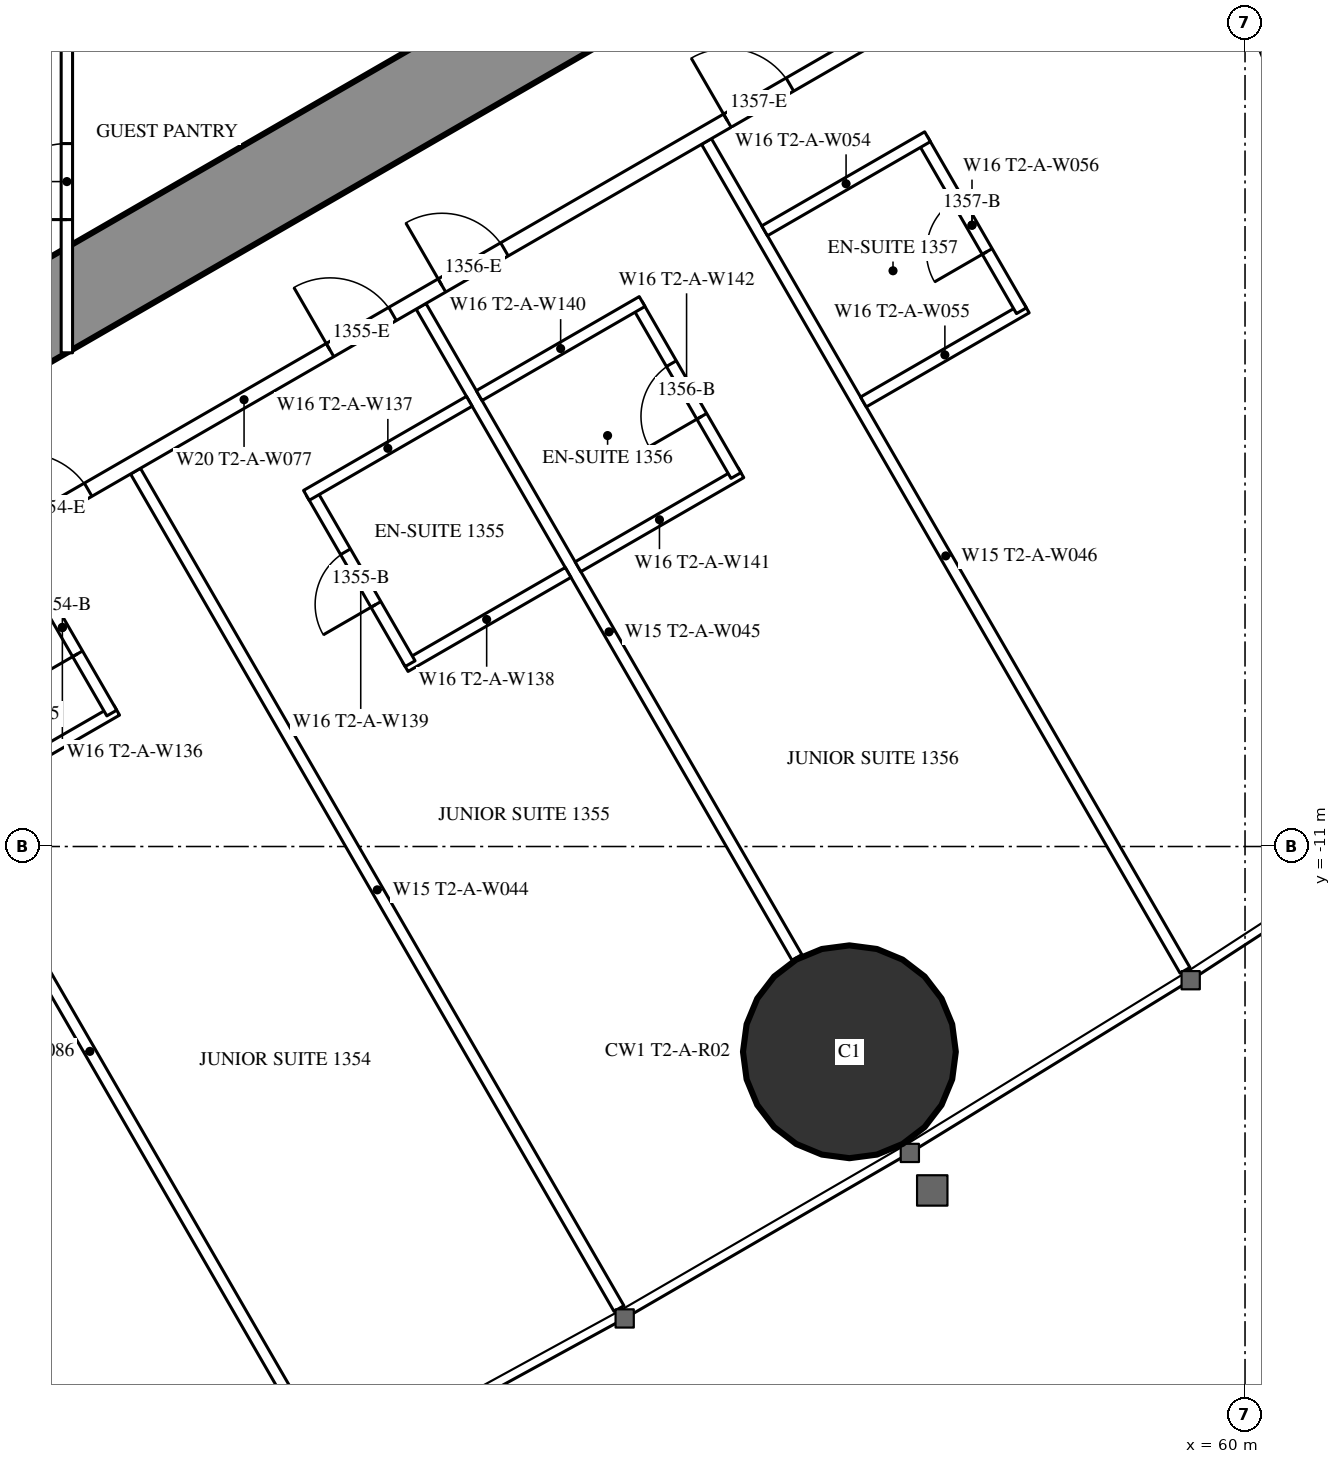
"""IFC4 building model, lengths in metres.
Left out: names, types, materials, properties, quantities, classifications, styles, units other than length and angle.
Written with IfcOpenShell. Run it as: python <this file> out.ifc"""

import sys

from ifc_helpers import new_model, si_unit, direction, frame, frame_2d, origin, origin_2d, place, context, subcontext, project, spatial, rectangle, hollow_circle, extrude, element, fill, save


model = new_model("IFC4")
c1 = context("Model", 3, precision=1e-05, world=origin(), true_north=direction((0.0, 1.0)))
c2 = subcontext(c1, "Body", "Model", "MODEL_VIEW")
j1 = project(units=[si_unit("LENGTHUNIT", "METRE"), si_unit("PLANEANGLEUNIT", "RADIAN")], contexts=[c1])
p1 = place(None, origin())
s1 = spatial("IfcSite", under=j1, at=p1, CompositionType="ELEMENT")
p2 = place(p1, origin())
s2 = spatial("IfcBuilding", under=s1, at=p2, CompositionType="ELEMENT")
p3 = place(p2, frame((0.0, 0.0, 53.0)))
s3 = spatial("IfcBuildingStorey", under=s2, at=p3, CompositionType="ELEMENT", Elevation=53.0)
p4 = place(p3, frame((54.795, -13.701, 0.0), z_axis=(0.0, 0.0, 1.0), x_axis=(1.0, 0.0, 0.0)))
e1 = element("IfcColumn", 1, at=p4, inside=s3, PredefinedType="COLUMN", context=c2, shape_type="SweptSolid", body=[
    extrude(hollow_circle(Radius=1.4, WallThickness=0.12, at=origin_2d()), origin(), (0.0, 0.0, 1.0), 3.5),
])
p5 = place(p3, frame((61.5, 0.0, 0.0), z_axis=(0.0, 0.0, 1.0), x_axis=(1.0, 0.0, 0.0)))
e2 = element("IfcColumn", 2, at=p5, inside=s3, PredefinedType="COLUMN", context=c2, shape_type="SweptSolid", body=[
    extrude(hollow_circle(Radius=1.4, WallThickness=0.1, at=origin_2d()), origin(), (0.0, 0.0, 1.0), 3.5),
])
p6 = place(p3, frame((27.2, -13.8, 0.0), z_axis=(0.0, 0.0, 1.0), x_axis=(0.866027159892, 0.499996958321, 0.0)))
e3 = element("IfcWall", 3, at=p6, inside=s3, PredefinedType="SHEAR", context=c2, shape_type="SweptSolid", body=[
    extrude(rectangle(XDim=27.947, YDim=1.2, at=frame_2d((13.973, 0.0))), origin(), (0.0, 0.0, 1.0), 3.5),
])
p7 = place(p6, frame((4.6, 0.0, 0.0)))
e4 = element("IfcOpeningElement", 4, at=p7, cuts=e3, PredefinedType="OPENING", context=c2, shape_type="SweptSolid", body=[
    extrude(rectangle(XDim=1.0, YDim=2.2, at=frame_2d((0.5, 1.1))), frame((0.0, 0.61, 0.0), z_axis=(0.0, -1.0, 0.0), x_axis=(1.0, 0.0, 0.0)), (0.0, 0.0, 1.0), 1.22),
])
p8 = place(p6, frame((13.395, 0.0, 0.0)))
e5 = element("IfcOpeningElement", 5, at=p8, cuts=e3, PredefinedType="OPENING", context=c2, shape_type="SweptSolid", body=[
    extrude(rectangle(XDim=1.8, YDim=2.2, at=frame_2d((0.9, 1.1))), frame((0.0, 0.61, 0.0), z_axis=(0.0, -1.0, 0.0), x_axis=(1.0, 0.0, 0.0)), (0.0, 0.0, 1.0), 1.22),
])
p9 = place(p3, frame((41.647, -8.23, 0.0), z_axis=(0.0, 0.0, 1.0), x_axis=(0.49998590462, -0.866033541603, 0.0)))
e6 = element("IfcWall", 6, at=p9, inside=s3, PredefinedType="PARTITIONING", context=c2, shape_type="SweptSolid", body=[
    extrude(rectangle(XDim=12.621, YDim=0.15, at=frame_2d((6.311, 0.0))), origin(), (0.0, 0.0, 1.0), 3.25),
])
p10 = place(p3, frame((45.403, -6.062, 0.0), z_axis=(0.0, 0.0, 1.0), x_axis=(0.500007077968, -0.866021317279, 0.0)))
e7 = element("IfcWall", 7, at=p10, inside=s3, PredefinedType="PARTITIONING", context=c2, shape_type="SweptSolid", body=[
    extrude(rectangle(XDim=12.721, YDim=0.15, at=frame_2d((6.361, 0.0))), origin(), (0.0, 0.0, 1.0), 3.25),
])
p11 = place(p3, frame((49.159, -3.893, 0.0), z_axis=(0.0, 0.0, 1.0), x_axis=(0.499998773722, -0.866026111775, 0.0)))
e8 = element("IfcWall", 8, at=p11, inside=s3, PredefinedType="PARTITIONING", context=c2, shape_type="SweptSolid", body=[
    extrude(rectangle(XDim=9.892, YDim=0.15, at=frame_2d((4.946, 0.0))), origin(), (0.0, 0.0, 1.0), 2.25),
])
p12 = place(p3, frame((52.915, -1.725, 0.0), z_axis=(0.0, 0.0, 1.0), x_axis=(0.499997163113, -0.866027041656, 0.0)))
e9 = element("IfcWall", 9, at=p12, inside=s3, PredefinedType="PARTITIONING", context=c2, shape_type="SweptSolid", body=[
    extrude(rectangle(XDim=12.591, YDim=0.15, at=frame_2d((6.295, 0.0))), origin(), (0.0, 0.0, 1.0), 3.25),
])
p13 = place(p3, frame((37.96, -10.243, 0.0), z_axis=(0.0, 0.0, 1.0), x_axis=(0.866026429433, 0.499998223521, 0.0)))
e10 = element("IfcWall", 10, at=p13, inside=s3, PredefinedType="PARTITIONING", context=c2, shape_type="SweptSolid", body=[
    extrude(rectangle(XDim=20.487, YDim=0.2, at=frame_2d((10.243, 0.0))), origin(), (0.0, 0.0, 1.0), 3.25),
])
p14 = place(p13, frame((6.925, 0.0, 0.0)))
e11 = element("IfcOpeningElement", 11, at=p14, cuts=e10, PredefinedType="OPENING", context=c2, shape_type="SweptSolid", body=[
    extrude(rectangle(XDim=0.95, YDim=2.2, at=frame_2d((0.475, 1.1))), frame((0.0, 0.11, 0.0), z_axis=(0.0, -1.0, 0.0), x_axis=(1.0, 0.0, 0.0)), (0.0, 0.0, 1.0), 0.22),
])
p15 = place(p13, frame((11.549, 0.0, 0.0)))
e12 = element("IfcOpeningElement", 12, at=p15, cuts=e10, PredefinedType="OPENING", context=c2, shape_type="SweptSolid", body=[
    extrude(rectangle(XDim=0.95, YDim=2.2, at=frame_2d((0.475, 1.1))), frame((0.0, 0.11, 0.0), z_axis=(0.0, -1.0, 0.0), x_axis=(1.0, 0.0, 0.0)), (0.0, 0.0, 1.0), 0.22),
])
p16 = place(p13, frame((13.249, 0.0, 0.0)))
e13 = element("IfcOpeningElement", 13, at=p16, cuts=e10, PredefinedType="OPENING", context=c2, shape_type="SweptSolid", body=[
    extrude(rectangle(XDim=0.95, YDim=2.2, at=frame_2d((0.475, 1.1))), frame((0.0, 0.11, 0.0), z_axis=(0.0, -1.0, 0.0), x_axis=(1.0, 0.0, 0.0)), (0.0, 0.0, 1.0), 0.22),
])
p17 = place(p13, frame((17.585, 0.0, 0.0)))
e14 = element("IfcOpeningElement", 14, at=p17, cuts=e10, PredefinedType="OPENING", context=c2, shape_type="SweptSolid", body=[
    extrude(rectangle(XDim=0.95, YDim=2.2, at=frame_2d((0.475, 1.1))), frame((0.0, 0.11, 0.0), z_axis=(0.0, -1.0, 0.0), x_axis=(1.0, 0.0, 0.0)), (0.0, 0.0, 1.0), 0.22),
])
p18 = place(p13, frame((0.6, 0.0, 0.0)))
e15 = element("IfcOpeningElement", 15, at=p18, cuts=e10, PredefinedType="OPENING", context=c2, shape_type="SweptSolid", body=[
    extrude(rectangle(XDim=0.95, YDim=2.2, at=frame_2d((0.475, 1.1))), frame((0.0, 0.11, 0.0), z_axis=(0.0, -1.0, 0.0), x_axis=(1.0, 0.0, 0.0)), (0.0, 0.0, 1.0), 0.22),
])
p19 = place(p3, frame((43.012, -10.444, 0.0), z_axis=(0.0, 0.0, 1.0), x_axis=(0.866031185235, 0.4999899861, 0.0)))
e16 = element("IfcWall", 16, at=p19, inside=s3, PredefinedType="PARTITIONING", context=c2, shape_type="SweptSolid", body=[
    extrude(rectangle(XDim=2.475, YDim=0.15, at=frame_2d((1.238, 0.0))), origin(), (0.0, 0.0, 1.0), 3.25),
])
p20 = place(p3, frame((43.791, -6.993, 0.0), z_axis=(0.0, 0.0, 1.0), x_axis=(0.500047596559, -0.865997922154, 0.0)))
e17 = element("IfcWall", 17, at=p20, inside=s3, PredefinedType="PARTITIONING", context=c2, shape_type="SweptSolid", body=[
    extrude(rectangle(XDim=2.6, YDim=0.15, at=frame_2d((1.3, 0.0))), origin(), (0.0, 0.0, 1.0), 3.25),
])
p21 = place(p20, frame((0.9, 0.0, 0.0)))
e18 = element("IfcOpeningElement", 18, at=p21, cuts=e17, PredefinedType="OPENING", context=c2, shape_type="SweptSolid", body=[
    extrude(rectangle(XDim=0.8, YDim=2.2, at=frame_2d((0.4, 1.1))), frame((0.0, 0.085, 0.0), z_axis=(0.0, -1.0, 0.0), x_axis=(1.0, 0.0, 0.0)), (0.0, 0.0, 1.0), 0.17),
])
p22 = place(p3, frame((48.951, -8.632, 0.0), z_axis=(0.0, 0.0, 1.0), x_axis=(0.866006523861, 0.500032699561, 0.0)))
e19 = element("IfcWall", 19, at=p22, inside=s3, PredefinedType="PARTITIONING", context=c2, shape_type="SweptSolid", body=[
    extrude(rectangle(XDim=2.475, YDim=0.15, at=frame_2d((1.237, 0.0))), origin(), (0.0, 0.0, 1.0), 3.25),
])
p23 = place(p3, frame((47.716, -6.343, 0.0), z_axis=(0.0, 0.0, 1.0), x_axis=(0.500006934395, -0.866021400173, 0.0)))
e20 = element("IfcWall", 20, at=p23, inside=s3, PredefinedType="PARTITIONING", context=c2, shape_type="SweptSolid", body=[
    extrude(rectangle(XDim=2.6, YDim=0.15, at=frame_2d((1.3, 0.0))), origin(), (0.0, 0.0, 1.0), 3.25),
])
p24 = place(p23, frame((0.9, 0.0, 0.0)))
e21 = element("IfcOpeningElement", 21, at=p24, cuts=e20, PredefinedType="OPENING", context=c2, shape_type="SweptSolid", body=[
    extrude(rectangle(XDim=0.8, YDim=2.2, at=frame_2d((0.4, 1.1))), frame((0.0, 0.085, 0.0), z_axis=(0.0, -1.0, 0.0), x_axis=(1.0, 0.0, 0.0)), (0.0, 0.0, 1.0), 0.17),
])
for number, where, z_axis, x_axis in (
    (22, (47.651, -6.38, 0.0), (0.0, 0.0, 1.0), (0.866, 0.5, 0.0)),
    (23, (51.224, -7.32, 0.0), (0.0, 0.0, 1.0), (0.866, 0.5, 0.0)),
):
    element("IfcWall", number, at=place(p3, frame(where, z_axis=z_axis, x_axis=x_axis)), inside=s3, PredefinedType="PARTITIONING", context=c2, shape_type="SweptSolid", body=[
        extrude(rectangle(XDim=2.475, YDim=0.15, at=frame_2d((1.238, 0.0))), origin(), (0.0, 0.0, 1.0), 3.25),
    ])
p25 = place(p3, frame((52.003, -3.868, 0.0), z_axis=(0.0, 0.0, 1.0), x_axis=(0.500047596559, -0.865997922154, 0.0)))
e24 = element("IfcWall", 24, at=p25, inside=s3, PredefinedType="PARTITIONING", context=c2, shape_type="SweptSolid", body=[
    extrude(rectangle(XDim=2.6, YDim=0.15, at=frame_2d((1.3, 0.0))), origin(), (0.0, 0.0, 1.0), 3.25),
])
p26 = place(p25, frame((0.9, 0.0, 0.0)))
e25 = element("IfcOpeningElement", 25, at=p26, cuts=e24, PredefinedType="OPENING", context=c2, shape_type="SweptSolid", body=[
    extrude(rectangle(XDim=0.8, YDim=2.2, at=frame_2d((0.4, 1.1))), frame((0.0, 0.085, 0.0), z_axis=(0.0, -1.0, 0.0), x_axis=(1.0, 0.0, 0.0)), (0.0, 0.0, 1.0), 0.17),
])
for number, where, z_axis, x_axis in (
    (26, (49.925, -5.068, 0.0), (0.0, 0.0, 1.0), (0.866, 0.5, 0.0)),
    (27, (54.98, -5.151, 0.0), (0.0, 0.0, 1.0), (0.866, 0.5, 0.0)),
):
    element("IfcWall", number, at=place(p3, frame(where, z_axis=z_axis, x_axis=x_axis)), inside=s3, PredefinedType="PARTITIONING", context=c2, shape_type="SweptSolid", body=[
        extrude(rectangle(XDim=2.475, YDim=0.15, at=frame_2d((1.237, 0.0))), origin(), (0.0, 0.0, 1.0), 3.25),
    ])
p27 = place(p3, frame((55.758, -1.7, 0.0), z_axis=(0.0, 0.0, 1.0), x_axis=(0.500006934395, -0.866021400173, 0.0)))
e28 = element("IfcWall", 28, at=p27, inside=s3, PredefinedType="PARTITIONING", context=c2, shape_type="SweptSolid", body=[
    extrude(rectangle(XDim=2.6, YDim=0.15, at=frame_2d((1.3, 0.0))), origin(), (0.0, 0.0, 1.0), 3.25),
])
p28 = place(p27, frame((0.9, 0.0, 0.0)))
e29 = element("IfcOpeningElement", 29, at=p28, cuts=e28, PredefinedType="OPENING", context=c2, shape_type="SweptSolid", body=[
    extrude(rectangle(XDim=0.8, YDim=2.2, at=frame_2d((0.4, 1.1))), frame((0.0, 0.085, 0.0), z_axis=(0.0, -1.0, 0.0), x_axis=(1.0, 0.0, 0.0)), (0.0, 0.0, 1.0), 0.17),
])
p29 = place(p3, frame((53.68, -2.9, 0.0), z_axis=(0.0, 0.0, 1.0), x_axis=(0.866006523861, 0.500032699561, 0.0)))
e30 = element("IfcWall", 30, at=p29, inside=s3, PredefinedType="PARTITIONING", context=c2, shape_type="SweptSolid", body=[
    extrude(rectangle(XDim=2.475, YDim=0.15, at=frame_2d((1.237, 0.0))), origin(), (0.0, 0.0, 1.0), 3.25),
])
p30 = place(p3, frame((44.5, -4.505, 0.0), z_axis=(0.0, 0.0, 1.0), x_axis=(0.0, 1.0, 0.0)))
e31 = element("IfcWall", 31, at=p30, inside=s3, PredefinedType="PARTITIONING", context=c2, shape_type="SweptSolid", body=[
    extrude(rectangle(XDim=9.009, YDim=0.15, at=frame_2d((4.505, 0.0))), origin(), (0.0, 0.0, 1.0), 2.45),
])
p31 = place(p30, frame((1.752, 0.0, 0.0)))
e32 = element("IfcOpeningElement", 32, at=p31, cuts=e31, PredefinedType="OPENING", context=c2, shape_type="SweptSolid", body=[
    extrude(rectangle(XDim=1.0, YDim=2.2, at=frame_2d((0.5, 1.1))), frame((0.0, 0.085, 0.0), z_axis=(0.0, -1.0, 0.0), x_axis=(1.0, 0.0, 0.0)), (0.0, 0.0, 1.0), 0.17),
])
p32 = place(p30, frame((6.257, 0.0, 0.0)))
e33 = element("IfcOpeningElement", 33, at=p32, cuts=e31, PredefinedType="OPENING", context=c2, shape_type="SweptSolid", body=[
    extrude(rectangle(XDim=1.0, YDim=2.2, at=frame_2d((0.5, 1.1))), frame((0.0, 0.085, 0.0), z_axis=(0.0, -1.0, 0.0), x_axis=(1.0, 0.0, 0.0)), (0.0, 0.0, 1.0), 0.17),
])
p33 = place(p21, origin())
e34 = element("IfcDoor", 34, at=p33, inside=s3, OperationType="SINGLE_SWING_RIGHT", PredefinedType="DOOR", context=c2, shape_type="SweptSolid", body=[
    extrude(rectangle(XDim=0.8, YDim=2.2, at=frame_2d((0.4, 1.1))), frame((0.0, 0.025, 0.0), z_axis=(0.0, -1.0, 0.0), x_axis=(1.0, 0.0, 0.0)), (0.0, 0.0, 1.0), 0.05),
])
fill(e18, e34)
p34 = place(p14, origin())
e35 = element("IfcDoor", 35, at=p34, inside=s3, OperationType="SINGLE_SWING_LEFT", PredefinedType="DOOR", context=c2, shape_type="SweptSolid", body=[
    extrude(rectangle(XDim=0.95, YDim=2.2, at=frame_2d((0.475, 1.1))), frame((0.0, 0.025, 0.0), z_axis=(0.0, -1.0, 0.0), x_axis=(1.0, 0.0, 0.0)), (0.0, 0.0, 1.0), 0.05),
])
fill(e11, e35)
p35 = place(p24, origin())
e36 = element("IfcDoor", 36, at=p35, inside=s3, OperationType="SINGLE_SWING_RIGHT", PredefinedType="DOOR", context=c2, shape_type="SweptSolid", body=[
    extrude(rectangle(XDim=0.8, YDim=2.2, at=frame_2d((0.4, 1.1))), frame((0.0, 0.025, 0.0), z_axis=(0.0, -1.0, 0.0), x_axis=(1.0, 0.0, 0.0)), (0.0, 0.0, 1.0), 0.05),
])
fill(e21, e36)
p36 = place(p15, origin())
e37 = element("IfcDoor", 37, at=p36, inside=s3, OperationType="SINGLE_SWING_LEFT", PredefinedType="DOOR", context=c2, shape_type="SweptSolid", body=[
    extrude(rectangle(XDim=0.95, YDim=2.2, at=frame_2d((0.475, 1.1))), frame((0.0, 0.025, 0.0), z_axis=(0.0, -1.0, 0.0), x_axis=(1.0, 0.0, 0.0)), (0.0, 0.0, 1.0), 0.05),
])
fill(e12, e37)
p37 = place(p26, origin())
e38 = element("IfcDoor", 38, at=p37, inside=s3, OperationType="SINGLE_SWING_RIGHT", PredefinedType="DOOR", context=c2, shape_type="SweptSolid", body=[
    extrude(rectangle(XDim=0.8, YDim=2.2, at=frame_2d((0.4, 1.1))), frame((0.0, 0.025, 0.0), z_axis=(0.0, -1.0, 0.0), x_axis=(1.0, 0.0, 0.0)), (0.0, 0.0, 1.0), 0.05),
])
fill(e25, e38)
p38 = place(p16, origin())
e39 = element("IfcDoor", 39, at=p38, inside=s3, OperationType="SINGLE_SWING_LEFT", PredefinedType="DOOR", context=c2, shape_type="SweptSolid", body=[
    extrude(rectangle(XDim=0.95, YDim=2.2, at=frame_2d((0.475, 1.1))), frame((0.0, 0.025, 0.0), z_axis=(0.0, -1.0, 0.0), x_axis=(1.0, 0.0, 0.0)), (0.0, 0.0, 1.0), 0.05),
])
fill(e13, e39)
p39 = place(p28, origin())
e40 = element("IfcDoor", 40, at=p39, inside=s3, OperationType="SINGLE_SWING_RIGHT", PredefinedType="DOOR", context=c2, shape_type="SweptSolid", body=[
    extrude(rectangle(XDim=0.8, YDim=2.2, at=frame_2d((0.4, 1.1))), frame((0.0, 0.025, 0.0), z_axis=(0.0, -1.0, 0.0), x_axis=(1.0, 0.0, 0.0)), (0.0, 0.0, 1.0), 0.05),
])
fill(e29, e40)
p40 = place(p17, origin())
e41 = element("IfcDoor", 41, at=p40, inside=s3, OperationType="SINGLE_SWING_LEFT", PredefinedType="DOOR", context=c2, shape_type="SweptSolid", body=[
    extrude(rectangle(XDim=0.95, YDim=2.2, at=frame_2d((0.475, 1.1))), frame((0.0, 0.025, 0.0), z_axis=(0.0, -1.0, 0.0), x_axis=(1.0, 0.0, 0.0)), (0.0, 0.0, 1.0), 0.05),
])
fill(e14, e41)
p41 = place(p31, origin())
e42 = element("IfcDoor", 42, at=p41, inside=s3, OperationType="SINGLE_SWING_LEFT", PredefinedType="DOOR", context=c2, shape_type="SweptSolid", body=[
    extrude(rectangle(XDim=1.0, YDim=2.2, at=frame_2d((0.5, 1.1))), frame((0.0, 0.025, 0.0), z_axis=(0.0, -1.0, 0.0), x_axis=(1.0, 0.0, 0.0)), (0.0, 0.0, 1.0), 0.05),
])
fill(e32, e42)
save(model, sys.argv[1])
